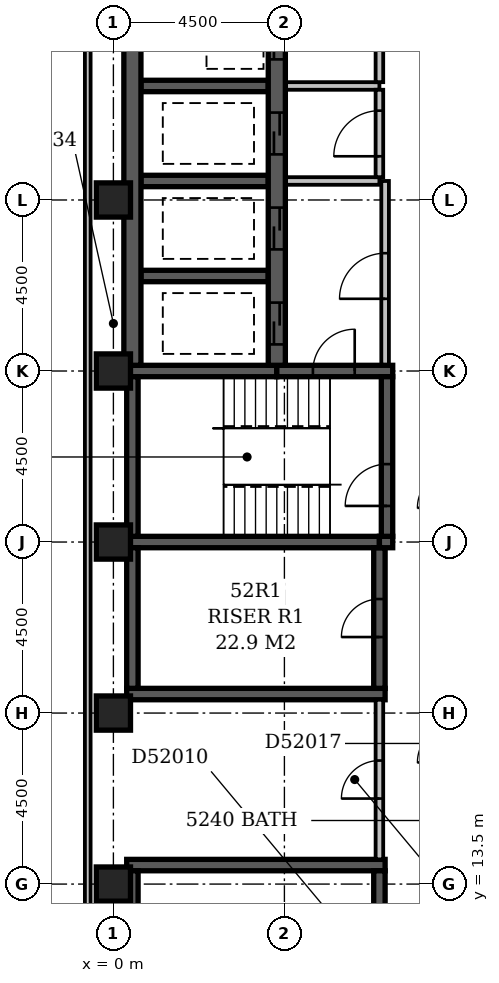
"""IFC4 building model, lengths in metres.
Left out: names, types, materials, properties, quantities, classifications, styles, units other than length and angle.
Written with IfcOpenShell. Run it as: python <this file> out.ifc"""

import sys

from ifc_helpers import new_model, si_unit, direction, frame, frame_2d, origin, origin_2d, place, context, subcontext, project, spatial, rectangle, extrude, element, fill, save


model = new_model("IFC4")
c1 = context("Model", 3, precision=1e-05, world=origin(), true_north=direction((0.0, 1.0)))
c2 = subcontext(c1, "Body", "Model", "MODEL_VIEW")
j1 = project(units=[si_unit("LENGTHUNIT", "METRE"), si_unit("PLANEANGLEUNIT", "RADIAN")], contexts=[c1])
p1 = place(None, origin())
s1 = spatial("IfcSite", under=j1, at=p1, CompositionType="ELEMENT")
p2 = place(p1, origin())
s2 = spatial("IfcBuilding", under=s1, at=p2, CompositionType="ELEMENT")
p3 = place(p2, frame((0.0, 0.0, 204.2)))
s3 = spatial("IfcBuildingStorey", under=s2, at=p3, CompositionType="ELEMENT", Elevation=204.2)
for number, where, z_axis, x_axis in (
    (1, (0.35, 14.0, -0.3), (0.0, 0.0, 1.0), (1.0, 0.0, 0.0)),
    (2, (0.35, 18.5, -0.3), (0.0, 0.0, 1.0), (1.0, 0.0, 0.0)),
):
    element("IfcWall", number, at=place(p3, frame(where, z_axis=z_axis, x_axis=x_axis)), inside=s3, PredefinedType="SHEAR", context=c2, shape_type="SweptSolid", body=[
        extrude(rectangle(XDim=6.8, YDim=0.3, at=frame_2d((3.4, 0.0))), origin(), (0.0, 0.0, 1.0), 3.6),
    ])
p4 = place(p3, frame((0.35, 22.5, -0.3), z_axis=(0.0, 0.0, 1.0), x_axis=(1.0, 0.0, 0.0)))
e3 = element("IfcWall", 3, at=p4, inside=s3, PredefinedType="SHEAR", context=c2, shape_type="SweptSolid", body=[
    extrude(rectangle(XDim=6.65, YDim=0.3, at=frame_2d((3.325, 0.0))), origin(), (0.0, 0.0, 1.0), 3.6),
])
p5 = place(p3, frame((0.35, 27.0, -0.3), z_axis=(0.0, 0.0, 1.0), x_axis=(1.0, 0.0, 0.0)))
e4 = element("IfcWall", 4, at=p5, inside=s3, PredefinedType="SHEAR", context=c2, shape_type="SweptSolid", body=[
    extrude(rectangle(XDim=3.95, YDim=0.3, at=frame_2d((1.975, 0.0))), origin(), (0.0, 0.0, 1.0), 3.6),
])
for number, where, z_axis, x_axis in (
    (5, (0.5, 10.15, -0.3), (0.0, 0.0, 1.0), (0.0, 1.0, 0.0)),
    (6, (0.5, 18.65, -0.3), (0.0, 0.0, 1.0), (0.0, 1.0, 0.0)),
):
    element("IfcWall", number, at=place(p3, frame(where, z_axis=z_axis, x_axis=x_axis)), inside=s3, PredefinedType="SHEAR", context=c2, shape_type="SweptSolid", body=[
        extrude(rectangle(XDim=3.7, YDim=0.3, at=frame_2d((1.85, 0.0))), origin(), (0.0, 0.0, 1.0), 3.6),
    ])
p6 = place(p3, frame((0.5, 22.65, -0.3), z_axis=(0.0, 0.0, 1.0), x_axis=(0.0, 1.0, 0.0)))
e7 = element("IfcWall", 7, at=p6, inside=s3, PredefinedType="SHEAR", context=c2, shape_type="SweptSolid", body=[
    extrude(rectangle(XDim=4.2, YDim=0.3, at=frame_2d((2.1, 0.0))), origin(), (0.0, 0.0, 1.0), 3.6),
])
p7 = place(p3, frame((0.5, 27.15, -0.3), z_axis=(0.0, 0.0, 1.0), x_axis=(0.0, 1.0, 0.0)))
e8 = element("IfcWall", 8, at=p7, inside=s3, PredefinedType="SHEAR", context=c2, shape_type="SweptSolid", body=[
    extrude(rectangle(XDim=22.125, YDim=0.45, at=frame_2d((11.062, 0.0))), origin(), (0.0, 0.0, 1.0), 3.6),
])
for number, where, z_axis, x_axis in (
    (9, (0.725, 29.5, -0.3), (0.0, 0.0, 1.0), (1.0, 0.0, 0.0)),
    (10, (0.725, 32.0, -0.3), (0.0, 0.0, 1.0), (1.0, 0.0, 0.0)),
    (11, (0.725, 34.5, -0.3), (0.0, 0.0, 1.0), (1.0, 0.0, 0.0)),
):
    element("IfcWall", number, at=place(p3, frame(where, z_axis=z_axis, x_axis=x_axis)), inside=s3, PredefinedType="SHEAR", context=c2, shape_type="SweptSolid", body=[
        extrude(rectangle(XDim=3.35, YDim=0.3, at=frame_2d((1.675, 0.0))), origin(), (0.0, 0.0, 1.0), 3.6),
    ])
p8 = place(p3, frame((4.3, 27.0, -0.3), z_axis=(0.0, 0.0, 1.0), x_axis=(1.0, 0.0, 0.0)))
e12 = element("IfcWall", 12, at=p8, inside=s3, PredefinedType="SHEAR", context=c2, shape_type="SweptSolid", body=[
    extrude(rectangle(XDim=3.05, YDim=0.3, at=frame_2d((1.525, 0.0))), origin(), (0.0, 0.0, 1.0), 3.6),
])
p9 = place(p8, frame((0.95, 0.0, 0.3)))
e13 = element("IfcOpeningElement", 13, at=p9, cuts=e12, PredefinedType="OPENING", context=c2, shape_type="SweptSolid", body=[
    extrude(rectangle(XDim=1.1, YDim=2.1, at=frame_2d((0.55, 1.05))), frame((0.0, 0.162, 0.0), z_axis=(0.0, -1.0, 0.0), x_axis=(1.0, 0.0, 0.0)), (0.0, 0.0, 1.0), 0.324),
])
p10 = place(p3, frame((4.3, 27.15, -0.3), z_axis=(0.0, 0.0, 1.0), x_axis=(0.0, 1.0, 0.0)))
e14 = element("IfcWall", 14, at=p10, inside=s3, PredefinedType="SHEAR", context=c2, shape_type="SweptSolid", body=[
    extrude(rectangle(XDim=22.125, YDim=0.45, at=frame_2d((11.062, 0.0))), origin(), (0.0, 0.0, 1.0), 3.6),
])
p11 = place(p10, frame((3.05, 0.0, 0.3)))
e15 = element("IfcOpeningElement", 15, at=p11, cuts=e14, PredefinedType="OPENING", context=c2, shape_type="SweptSolid", body=[
    extrude(rectangle(XDim=1.1, YDim=2.1, at=frame_2d((0.55, 1.05))), frame((0.0, 0.237, 0.0), z_axis=(0.0, -1.0, 0.0), x_axis=(1.0, 0.0, 0.0)), (0.0, 0.0, 1.0), 0.474),
])
p12 = place(p10, frame((0.55, 0.0, 0.3)))
e16 = element("IfcOpeningElement", 16, at=p12, cuts=e14, PredefinedType="OPENING", context=c2, shape_type="SweptSolid", body=[
    extrude(rectangle(XDim=1.1, YDim=2.1, at=frame_2d((0.55, 1.05))), frame((0.0, 0.237, 0.0), z_axis=(0.0, -1.0, 0.0), x_axis=(1.0, 0.0, 0.0)), (0.0, 0.0, 1.0), 0.474),
])
p13 = place(p10, frame((20.55, 0.0, 0.3)))
e17 = element("IfcOpeningElement", 17, at=p13, cuts=e14, PredefinedType="OPENING", context=c2, shape_type="SweptSolid", body=[
    extrude(rectangle(XDim=1.1, YDim=2.1, at=frame_2d((0.55, 1.05))), frame((0.0, 0.237, 0.0), z_axis=(0.0, -1.0, 0.0), x_axis=(1.0, 0.0, 0.0)), (0.0, 0.0, 1.0), 0.474),
])
p14 = place(p10, frame((18.05, 0.0, 0.3)))
e18 = element("IfcOpeningElement", 18, at=p14, cuts=e14, PredefinedType="OPENING", context=c2, shape_type="SweptSolid", body=[
    extrude(rectangle(XDim=1.1, YDim=2.1, at=frame_2d((0.55, 1.05))), frame((0.0, 0.237, 0.0), z_axis=(0.0, -1.0, 0.0), x_axis=(1.0, 0.0, 0.0)), (0.0, 0.0, 1.0), 0.474),
])
p15 = place(p10, frame((15.55, 0.0, 0.3)))
e19 = element("IfcOpeningElement", 19, at=p15, cuts=e14, PredefinedType="OPENING", context=c2, shape_type="SweptSolid", body=[
    extrude(rectangle(XDim=1.1, YDim=2.1, at=frame_2d((0.55, 1.05))), frame((0.0, 0.237, 0.0), z_axis=(0.0, -1.0, 0.0), x_axis=(1.0, 0.0, 0.0)), (0.0, 0.0, 1.0), 0.474),
])
p16 = place(p10, frame((13.05, 0.0, 0.3)))
e20 = element("IfcOpeningElement", 20, at=p16, cuts=e14, PredefinedType="OPENING", context=c2, shape_type="SweptSolid", body=[
    extrude(rectangle(XDim=1.1, YDim=2.1, at=frame_2d((0.55, 1.05))), frame((0.0, 0.237, 0.0), z_axis=(0.0, -1.0, 0.0), x_axis=(1.0, 0.0, 0.0)), (0.0, 0.0, 1.0), 0.474),
])
p17 = place(p10, frame((10.55, 0.0, 0.3)))
e21 = element("IfcOpeningElement", 21, at=p17, cuts=e14, PredefinedType="OPENING", context=c2, shape_type="SweptSolid", body=[
    extrude(rectangle(XDim=1.1, YDim=2.1, at=frame_2d((0.55, 1.05))), frame((0.0, 0.237, 0.0), z_axis=(0.0, -1.0, 0.0), x_axis=(1.0, 0.0, 0.0)), (0.0, 0.0, 1.0), 0.474),
])
p18 = place(p10, frame((8.05, 0.0, 0.3)))
e22 = element("IfcOpeningElement", 22, at=p18, cuts=e14, PredefinedType="OPENING", context=c2, shape_type="SweptSolid", body=[
    extrude(rectangle(XDim=1.1, YDim=2.1, at=frame_2d((0.55, 1.05))), frame((0.0, 0.237, 0.0), z_axis=(0.0, -1.0, 0.0), x_axis=(1.0, 0.0, 0.0)), (0.0, 0.0, 1.0), 0.474),
])
p19 = place(p10, frame((5.55, 0.0, 0.3)))
e23 = element("IfcOpeningElement", 23, at=p19, cuts=e14, PredefinedType="OPENING", context=c2, shape_type="SweptSolid", body=[
    extrude(rectangle(XDim=1.1, YDim=2.1, at=frame_2d((0.55, 1.05))), frame((0.0, 0.237, 0.0), z_axis=(0.0, -1.0, 0.0), x_axis=(1.0, 0.0, 0.0)), (0.0, 0.0, 1.0), 0.474),
])
p20 = place(p3, frame((7.0, 10.15, -0.3), z_axis=(0.0, 0.0, 1.0), x_axis=(0.0, 1.0, 0.0)))
e24 = element("IfcWall", 24, at=p20, inside=s3, PredefinedType="SHEAR", context=c2, shape_type="SweptSolid", body=[
    extrude(rectangle(XDim=3.7, YDim=0.3, at=frame_2d((1.85, 0.0))), origin(), (0.0, 0.0, 1.0), 3.6),
])
p21 = place(p20, frame((1.35, 0.0, 0.3)))
e25 = element("IfcOpeningElement", 25, at=p21, cuts=e24, PredefinedType="OPENING", context=c2, shape_type="SweptSolid", body=[
    extrude(rectangle(XDim=1.0, YDim=2.1, at=frame_2d((0.5, 1.05))), frame((0.0, 0.162, 0.0), z_axis=(0.0, -1.0, 0.0), x_axis=(1.0, 0.0, 0.0)), (0.0, 0.0, 1.0), 0.324),
])
p22 = place(p3, frame((7.0, 18.65, -0.3), z_axis=(0.0, 0.0, 1.0), x_axis=(0.0, 1.0, 0.0)))
e26 = element("IfcWall", 26, at=p22, inside=s3, PredefinedType="SHEAR", context=c2, shape_type="SweptSolid", body=[
    extrude(rectangle(XDim=3.7, YDim=0.3, at=frame_2d((1.85, 0.0))), origin(), (0.0, 0.0, 1.0), 3.6),
])
p23 = place(p22, frame((1.35, 0.0, 0.3)))
e27 = element("IfcOpeningElement", 27, at=p23, cuts=e26, PredefinedType="OPENING", context=c2, shape_type="SweptSolid", body=[
    extrude(rectangle(XDim=1.0, YDim=2.1, at=frame_2d((0.5, 1.05))), frame((0.0, 0.162, 0.0), z_axis=(0.0, -1.0, 0.0), x_axis=(1.0, 0.0, 0.0)), (0.0, 0.0, 1.0), 0.324),
])
p24 = place(p3, frame((7.0, 22.5, -0.3), z_axis=(0.0, 0.0, 1.0), x_axis=(1.0, 0.0, 0.0)))
e28 = element("IfcWall", 28, at=p24, inside=s3, PredefinedType="SHEAR", context=c2, shape_type="SweptSolid", body=[
    extrude(rectangle(XDim=0.35, YDim=0.3, at=frame_2d((0.175, 0.0))), origin(), (0.0, 0.0, 1.0), 3.6),
])
p25 = place(p3, frame((7.2, 22.65, -0.3), z_axis=(0.0, 0.0, 1.0), x_axis=(0.0, 1.0, 0.0)))
e29 = element("IfcWall", 29, at=p25, inside=s3, PredefinedType="SHEAR", context=c2, shape_type="SweptSolid", body=[
    extrude(rectangle(XDim=4.2, YDim=0.3, at=frame_2d((2.1, 0.0))), origin(), (0.0, 0.0, 1.0), 3.6),
])
p26 = place(p25, frame((0.8, 0.0, 0.3)))
e30 = element("IfcOpeningElement", 30, at=p26, cuts=e29, PredefinedType="OPENING", context=c2, shape_type="SweptSolid", body=[
    extrude(rectangle(XDim=1.1, YDim=2.1, at=frame_2d((0.55, 1.05))), frame((0.0, 0.162, 0.0), z_axis=(0.0, -1.0, 0.0), x_axis=(1.0, 0.0, 0.0)), (0.0, 0.0, 1.0), 0.324),
])
for number, where, z_axis, x_axis in (
    (31, (0.0, 13.5, -0.3), (0.0, 0.0, 1.0), (1.0, 0.0, 0.0)),
    (32, (0.0, 18.0, -0.3), (0.0, 0.0, 1.0), (1.0, 0.0, 0.0)),
    (33, (0.0, 22.5, -0.3), (0.0, 0.0, 1.0), (1.0, 0.0, 0.0)),
    (34, (0.0, 27.0, -0.3), (0.0, 0.0, 1.0), (1.0, 0.0, 0.0)),
    (35, (0.0, 31.5, -0.3), (0.0, 0.0, 1.0), (1.0, 0.0, 0.0)),
):
    element("IfcColumn", number, at=place(p3, frame(where, z_axis=z_axis, x_axis=x_axis)), inside=s3, PredefinedType="COLUMN", context=c2, shape_type="SweptSolid", body=[
        extrude(rectangle(XDim=0.9, YDim=0.9, at=origin_2d()), origin(), (0.0, 0.0, 1.0), 3.6),
    ])
p27 = place(p3, frame((-0.675, 59.1, 0.0), z_axis=(0.0, 0.0, 1.0), x_axis=(0.0, -1.0, 0.0)))
e36 = element("IfcWall", 36, at=p27, inside=s3, PredefinedType="STANDARD", context=c2, shape_type="SweptSolid", body=[
    extrude(rectangle(XDim=55.35, YDim=0.15, at=frame_2d((27.675, 0.0))), origin(), (0.0, 0.0, 1.0), 2.7),
])
p28 = place(p3, frame((4.545, 34.5, 0.0), z_axis=(0.0, 0.0, 1.0), x_axis=(1.0, 0.0, 0.0)))
e37 = element("IfcWall", 37, at=p28, inside=s3, PredefinedType="PARTITIONING", context=c2, shape_type="SweptSolid", body=[
    extrude(rectangle(XDim=2.455, YDim=0.2, at=frame_2d((1.228, 0.0))), origin(), (0.0, 0.0, 1.0), 3.3),
])
p29 = place(p3, frame((7.0, 34.6, 0.0), z_axis=(0.0, 0.0, 1.0), x_axis=(0.0, 1.0, 0.0)))
e38 = element("IfcWall", 38, at=p29, inside=s3, PredefinedType="PARTITIONING", context=c2, shape_type="SweptSolid", body=[
    extrude(rectangle(XDim=14.9, YDim=0.2, at=frame_2d((7.45, 0.0))), origin(), (0.0, 0.0, 1.0), 3.3),
])
p30 = place(p29, frame((2.8, 0.0, 0.0)))
e39 = element("IfcOpeningElement", 39, at=p30, cuts=e38, PredefinedType="OPENING", context=c2, shape_type="SweptSolid", body=[
    extrude(rectangle(XDim=1.2, YDim=2.1, at=frame_2d((0.6, 1.05))), frame((0.0, 0.112, 0.0), z_axis=(0.0, -1.0, 0.0), x_axis=(1.0, 0.0, 0.0)), (0.0, 0.0, 1.0), 0.224),
])
p31 = place(p29, frame((9.8, 0.0, 0.0)))
e40 = element("IfcOpeningElement", 40, at=p31, cuts=e38, PredefinedType="OPENING", context=c2, shape_type="SweptSolid", body=[
    extrude(rectangle(XDim=1.2, YDim=2.1, at=frame_2d((0.6, 1.05))), frame((0.0, 0.112, 0.0), z_axis=(0.0, -1.0, 0.0), x_axis=(1.0, 0.0, 0.0)), (0.0, 0.0, 1.0), 0.224),
])
p32 = place(p3, frame((4.545, 32.0, 0.0), z_axis=(0.0, 0.0, 1.0), x_axis=(1.0, 0.0, 0.0)))
e41 = element("IfcWall", 41, at=p32, inside=s3, PredefinedType="PARTITIONING", context=c2, shape_type="SweptSolid", body=[
    extrude(rectangle(XDim=2.455, YDim=0.2, at=frame_2d((1.228, 0.0))), origin(), (0.0, 0.0, 1.0), 3.3),
])
p33 = place(p3, frame((7.0, 32.1, 0.0), z_axis=(0.0, 0.0, 1.0), x_axis=(0.0, 1.0, 0.0)))
e42 = element("IfcWall", 42, at=p33, inside=s3, PredefinedType="PARTITIONING", context=c2, shape_type="SweptSolid", body=[
    extrude(rectangle(XDim=2.3, YDim=0.2, at=frame_2d((1.15, 0.0))), origin(), (0.0, 0.0, 1.0), 3.3),
])
p34 = place(p33, frame((0.55, 0.0, 0.0)))
e43 = element("IfcOpeningElement", 43, at=p34, cuts=e42, PredefinedType="OPENING", context=c2, shape_type="SweptSolid", body=[
    extrude(rectangle(XDim=1.2, YDim=2.1, at=frame_2d((0.6, 1.05))), frame((0.0, 0.112, 0.0), z_axis=(0.0, -1.0, 0.0), x_axis=(1.0, 0.0, 0.0)), (0.0, 0.0, 1.0), 0.224),
])
p35 = place(p3, frame((7.15, 27.17, 0.0), z_axis=(0.0, 0.0, 1.0), x_axis=(0.0, 1.0, 0.0)))
e44 = element("IfcWall", 44, at=p35, inside=s3, PredefinedType="PARTITIONING", context=c2, shape_type="SweptSolid", body=[
    extrude(rectangle(XDim=4.83, YDim=0.2, at=frame_2d((2.415, 0.0))), origin(), (0.0, 0.0, 1.0), 3.3),
])
p36 = place(p35, frame((1.73, 0.0, 0.0)))
e45 = element("IfcOpeningElement", 45, at=p36, cuts=e44, PredefinedType="OPENING", context=c2, shape_type="SweptSolid", body=[
    extrude(rectangle(XDim=1.2, YDim=2.1, at=frame_2d((0.6, 1.05))), frame((0.0, 0.112, 0.0), z_axis=(0.0, -1.0, 0.0), x_axis=(1.0, 0.0, 0.0)), (0.0, 0.0, 1.0), 0.224),
])
p37 = place(p3, frame((7.0, 14.15, 0.0), z_axis=(0.0, 0.0, 1.0), x_axis=(0.0, 1.0, 0.0)))
e46 = element("IfcWall", 46, at=p37, inside=s3, PredefinedType="PARTITIONING", context=c2, shape_type="SweptSolid", body=[
    extrude(rectangle(XDim=4.2, YDim=0.2, at=frame_2d((2.1, 0.0))), origin(), (0.0, 0.0, 1.0), 3.3),
])
p38 = place(p37, frame((1.6, 0.0, 0.0)))
e47 = element("IfcOpeningElement", 47, at=p38, cuts=e46, PredefinedType="OPENING", context=c2, shape_type="SweptSolid", body=[
    extrude(rectangle(XDim=1.0, YDim=2.1, at=frame_2d((0.5, 1.05))), frame((0.0, 0.112, 0.0), z_axis=(0.0, -1.0, 0.0), x_axis=(1.0, 0.0, 0.0)), (0.0, 0.0, 1.0), 0.224),
])
p39 = place(p36, origin())
e48 = element("IfcDoor", 48, at=p39, inside=s3, OperationType="SINGLE_SWING_LEFT", PredefinedType="DOOR", context=c2, shape_type="SweptSolid", body=[
    extrude(rectangle(XDim=1.2, YDim=2.1, at=frame_2d((0.6, 1.05))), frame((0.0, 0.025, 0.0), z_axis=(0.0, -1.0, 0.0), x_axis=(1.0, 0.0, 0.0)), (0.0, 0.0, 1.0), 0.05),
])
fill(e45, e48)
p40 = place(p11, origin())
e49 = element("IfcDoor", 49, at=p40, inside=s3, OperationType="SLIDING_TO_LEFT", PredefinedType="DOOR", context=c2, shape_type="SweptSolid", body=[
    extrude(rectangle(XDim=1.1, YDim=2.1, at=frame_2d((0.55, 1.05))), frame((0.0, 0.025, 0.0), z_axis=(0.0, -1.0, 0.0), x_axis=(1.0, 0.0, 0.0)), (0.0, 0.0, 1.0), 0.05),
])
fill(e15, e49)
p41 = place(p12, origin())
e50 = element("IfcDoor", 50, at=p41, inside=s3, OperationType="SLIDING_TO_LEFT", PredefinedType="DOOR", context=c2, shape_type="SweptSolid", body=[
    extrude(rectangle(XDim=1.1, YDim=2.1, at=frame_2d((0.55, 1.05))), frame((0.0, 0.025, 0.0), z_axis=(0.0, -1.0, 0.0), x_axis=(1.0, 0.0, 0.0)), (0.0, 0.0, 1.0), 0.05),
])
fill(e16, e50)
p42 = place(p18, origin())
e51 = element("IfcDoor", 51, at=p42, inside=s3, OperationType="SLIDING_TO_LEFT", PredefinedType="DOOR", context=c2, shape_type="SweptSolid", body=[
    extrude(rectangle(XDim=1.1, YDim=2.1, at=frame_2d((0.55, 1.05))), frame((0.0, 0.025, 0.0), z_axis=(0.0, -1.0, 0.0), x_axis=(1.0, 0.0, 0.0)), (0.0, 0.0, 1.0), 0.05),
])
fill(e22, e51)
p43 = place(p34, origin())
e52 = element("IfcDoor", 52, at=p43, inside=s3, OperationType="SINGLE_SWING_LEFT", PredefinedType="DOOR", context=c2, shape_type="SweptSolid", body=[
    extrude(rectangle(XDim=1.2, YDim=2.1, at=frame_2d((0.6, 1.05))), frame((0.0, 0.025, 0.0), z_axis=(0.0, -1.0, 0.0), x_axis=(1.0, 0.0, 0.0)), (0.0, 0.0, 1.0), 0.05),
])
fill(e43, e52)
p44 = place(p19, origin())
e53 = element("IfcDoor", 53, at=p44, inside=s3, OperationType="SLIDING_TO_LEFT", PredefinedType="DOOR", context=c2, shape_type="SweptSolid", body=[
    extrude(rectangle(XDim=1.1, YDim=2.1, at=frame_2d((0.55, 1.05))), frame((0.0, 0.025, 0.0), z_axis=(0.0, -1.0, 0.0), x_axis=(1.0, 0.0, 0.0)), (0.0, 0.0, 1.0), 0.05),
])
fill(e23, e53)
p45 = place(p23, origin())
e54 = element("IfcDoor", 54, at=p45, inside=s3, OperationType="SINGLE_SWING_LEFT", PredefinedType="DOOR", context=c2, shape_type="SweptSolid", body=[
    extrude(rectangle(XDim=1.0, YDim=2.1, at=frame_2d((0.5, 1.05))), frame((0.0, 0.025, 0.0), z_axis=(0.0, -1.0, 0.0), x_axis=(1.0, 0.0, 0.0)), (0.0, 0.0, 1.0), 0.05),
])
fill(e27, e54)
p46 = place(p9, frame((1.1, 0.0, 0.0), z_axis=(0.0, 0.0, 1.0), x_axis=(-1.0, 0.0, 0.0)))
e55 = element("IfcDoor", 55, at=p46, inside=s3, OperationType="SINGLE_SWING_LEFT", PredefinedType="DOOR", context=c2, shape_type="SweptSolid", body=[
    extrude(rectangle(XDim=1.1, YDim=2.1, at=frame_2d((0.55, 1.05))), frame((0.0, 0.025, 0.0), z_axis=(0.0, -1.0, 0.0), x_axis=(1.0, 0.0, 0.0)), (0.0, 0.0, 1.0), 0.05),
])
fill(e13, e55)
p47 = place(p26, origin())
e56 = element("IfcDoor", 56, at=p47, inside=s3, OperationType="SINGLE_SWING_LEFT", PredefinedType="DOOR", context=c2, shape_type="SweptSolid", body=[
    extrude(rectangle(XDim=1.1, YDim=2.1, at=frame_2d((0.55, 1.05))), frame((0.0, 0.025, 0.0), z_axis=(0.0, -1.0, 0.0), x_axis=(1.0, 0.0, 0.0)), (0.0, 0.0, 1.0), 0.05),
])
fill(e30, e56)
p48 = place(p38, origin())
e57 = element("IfcDoor", 57, at=p48, inside=s3, OperationType="SINGLE_SWING_LEFT", PredefinedType="DOOR", context=c2, shape_type="SweptSolid", body=[
    extrude(rectangle(XDim=1.0, YDim=2.1, at=frame_2d((0.5, 1.05))), frame((0.0, 0.025, 0.0), z_axis=(0.0, -1.0, 0.0), x_axis=(1.0, 0.0, 0.0)), (0.0, 0.0, 1.0), 0.05),
])
fill(e47, e57)
save(model, sys.argv[1])
